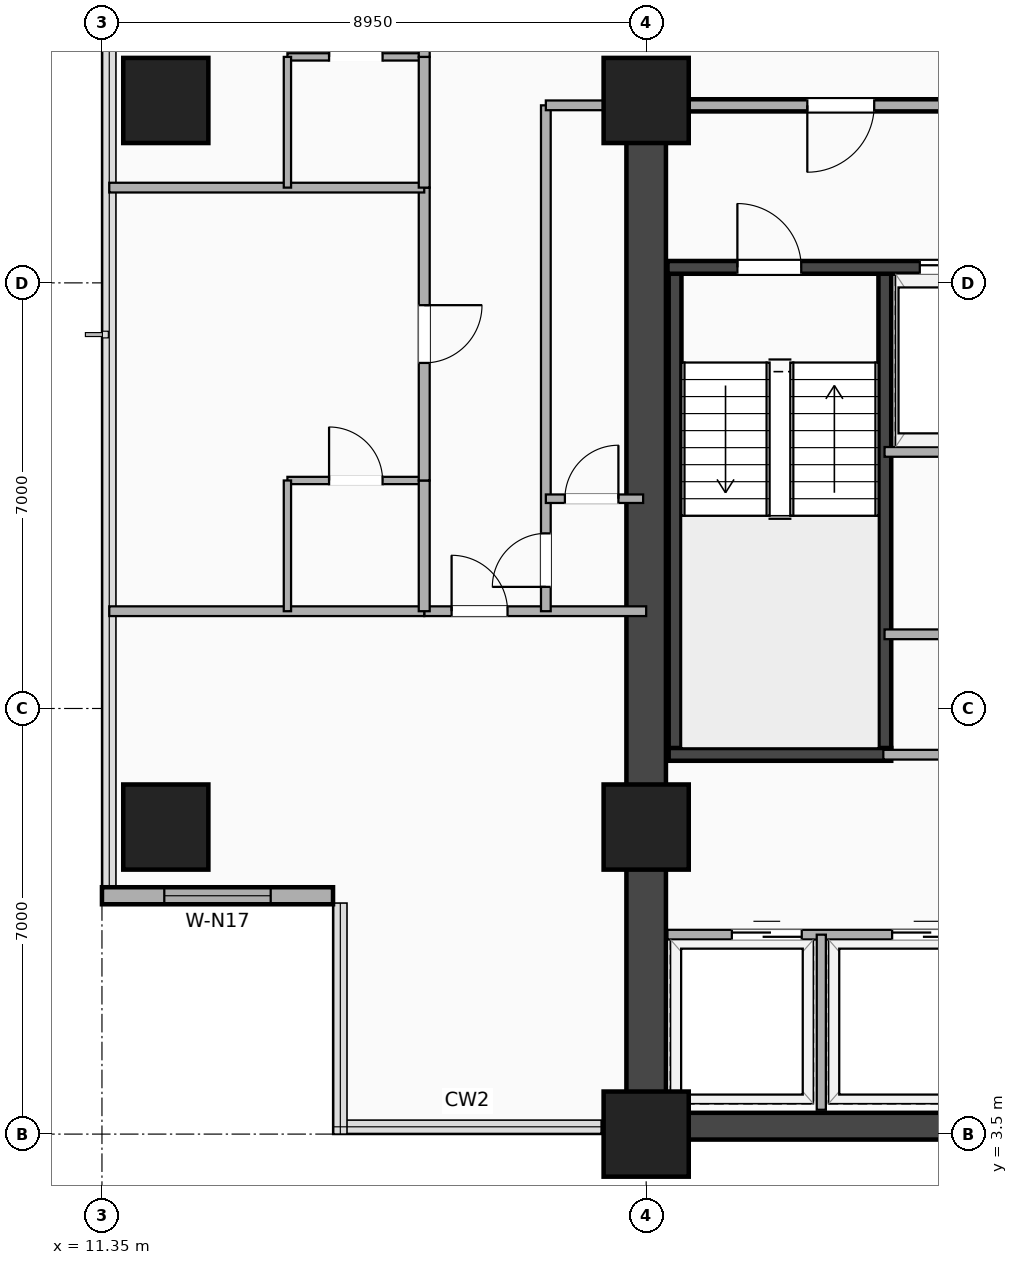
"""IFC4 building model, lengths in metres.
Left out: names, types, materials, properties, quantities, classifications, styles, units other than length and angle.
Written with IfcOpenShell. Run it as: python <this file> out.ifc"""

import sys

from ifc_helpers import new_model, si_unit, direction, frame, frame_2d, origin, origin_2d, place, context, subcontext, project, spatial, rectangle, extrude, element, fill, save


model = new_model("IFC4")
c1 = context("Model", 3, precision=1e-05, world=origin(), true_north=direction((0.0, 1.0)))
c2 = subcontext(c1, "Body", "Model", "MODEL_VIEW")
j1 = project(units=[si_unit("LENGTHUNIT", "METRE"), si_unit("PLANEANGLEUNIT", "RADIAN")], contexts=[c1])
p1 = place(None, origin())
s1 = spatial("IfcSite", under=j1, at=p1, CompositionType="ELEMENT")
p2 = place(p1, origin())
s2 = spatial("IfcBuilding", under=s1, at=p2, CompositionType="ELEMENT")
p3 = place(p2, frame((0.0, 0.0, 68.4)))
s3 = spatial("IfcBuildingStorey", under=s2, at=p3, CompositionType="ELEMENT", Elevation=68.4)
p4 = place(p3, frame((20.3, 3.63, 0.0), z_axis=(0.0, 0.0, 1.0), x_axis=(1.0, 0.0, 0.0)))
e1 = element("IfcWall", 1, at=p4, inside=s3, PredefinedType="SHEAR", context=c2, shape_type="SweptSolid", body=[
    extrude(rectangle(XDim=24.5, YDim=0.44, at=frame_2d((12.25, 0.0))), origin(), (0.0, 0.0, 1.0), 3.22),
])
p5 = place(p3, frame((20.3, 3.5, 0.0), z_axis=(0.0, 0.0, 1.0), x_axis=(0.0, 1.0, 0.0)))
e2 = element("IfcWall", 2, at=p5, inside=s3, PredefinedType="SHEAR", context=c2, shape_type="SweptSolid", body=[
    extrude(rectangle(XDim=16.9, YDim=0.65, at=frame_2d((8.45, 0.0))), origin(), (0.0, 0.0, 1.0), 3.22),
])
for number, where, z_axis, x_axis in (
    (3, (20.775, 9.745, 0.0), (0.0, 0.0, 1.0), (0.0, 1.0, 0.0)),
    (4, (24.225, 9.745, 0.0), (0.0, 0.0, 1.0), (0.0, 1.0, 0.0)),
):
    element("IfcWall", number, at=place(p3, frame(where, z_axis=z_axis, x_axis=x_axis)), inside=s3, PredefinedType="SHEAR", context=c2, shape_type="SweptSolid", body=[
        extrude(rectangle(XDim=8.01, YDim=0.21, at=frame_2d((4.005, 0.0))), origin(), (0.0, 0.0, 1.0), 3.22),
    ])
p6 = place(p3, frame((20.67, 9.745, 0.0), z_axis=(0.0, 0.0, 1.0), x_axis=(1.0, 0.0, 0.0)))
e5 = element("IfcWall", 5, at=p6, inside=s3, PredefinedType="SHEAR", context=c2, shape_type="SweptSolid", body=[
    extrude(rectangle(XDim=3.66, YDim=0.21, at=frame_2d((1.83, 0.0))), origin(), (0.0, 0.0, 1.0), 3.22),
])
p7 = place(p3, frame((20.65, 17.755, 0.0), z_axis=(0.0, 0.0, 1.0), x_axis=(1.0, 0.0, 0.0)))
e6 = element("IfcWall", 6, at=p7, inside=s3, PredefinedType="SHEAR", context=c2, shape_type="SweptSolid", body=[
    extrude(rectangle(XDim=8.3, YDim=0.21, at=frame_2d((4.15, 0.0))), origin(), (0.0, 0.0, 1.0), 3.22),
])
p8 = place(p7, frame((2.2, 0.0, 0.0), z_axis=(0.0, 0.0, 1.0), x_axis=(-1.0, 0.0, 0.0)))
e7 = element("IfcOpeningElement", 7, at=p8, cuts=e6, PredefinedType="OPENING", context=c2, shape_type="SweptSolid", body=[
    extrude(rectangle(XDim=1.05, YDim=2.15, at=frame_2d((0.525, 1.075))), frame((0.0, 0.115, 0.0), z_axis=(0.0, -1.0, 0.0), x_axis=(1.0, 0.0, 0.0)), (0.0, 0.0, 1.0), 0.23),
])
p9 = place(p7, frame((4.15, 0.0, 0.0)))
e8 = element("IfcOpeningElement", 8, at=p9, cuts=e6, PredefinedType="OPENING", context=c2, shape_type="SweptSolid", body=[
    extrude(rectangle(XDim=1.1, YDim=2.18, at=frame_2d((0.55, 1.09))), frame((0.0, 0.115, 0.0), z_axis=(0.0, -1.0, 0.0), x_axis=(1.0, 0.0, 0.0)), (0.0, 0.0, 1.0), 0.23),
])
p10 = place(p7, frame((6.45, 0.0, 0.0)))
e9 = element("IfcOpeningElement", 9, at=p10, cuts=e6, PredefinedType="OPENING", context=c2, shape_type="SweptSolid", body=[
    extrude(rectangle(XDim=1.12, YDim=2.2, at=frame_2d((0.56, 1.1))), frame((0.0, 0.115, 0.0), z_axis=(0.0, -1.0, 0.0), x_axis=(1.0, 0.0, 0.0)), (0.0, 0.0, 1.0), 0.23),
])
for number, where, z_axis, x_axis in (
    (10, (20.3, 3.5, -0.28), (0.0, 0.0, 1.0), (1.0, 0.0, 0.0)),
    (11, (20.3, 8.55, -0.28), (0.0, 0.0, 1.0), (1.0, 0.0, 0.0)),
    (12, (20.3, 20.5, -0.28), (0.0, 0.0, 1.0), (1.0, 0.0, 0.0)),
    (13, (12.4, 8.55, -0.28), (0.0, 0.0, 1.0), (1.0, 0.0, 0.0)),
    (14, (12.4, 20.5, -0.28), (0.0, 0.0, 1.0), (1.0, 0.0, 0.0)),
):
    element("IfcColumn", number, at=place(p3, frame(where, z_axis=z_axis, x_axis=x_axis)), inside=s3, PredefinedType="COLUMN", context=c2, shape_type="SweptSolid", body=[
        extrude(rectangle(XDim=1.4, YDim=1.4, at=origin_2d()), origin(), (0.0, 0.0, 1.0), 3.5),
    ])
p11 = place(p3, frame((11.35, 7.42, 0.0), z_axis=(0.0, 0.0, 1.0), x_axis=(1.0, 0.0, 0.0)))
e15 = element("IfcWall", 15, at=p11, inside=s3, PredefinedType="SOLIDWALL", context=c2, shape_type="SweptSolid", body=[
    extrude(rectangle(XDim=3.8, YDim=0.28, at=frame_2d((1.9, 0.0))), origin(), (0.0, 0.0, 1.0), 3.22),
])
p12 = place(p11, frame((1.025, 0.0, 0.85)))
e16 = element("IfcOpeningElement", 16, at=p12, cuts=e15, PredefinedType="OPENING", context=c2, shape_type="SweptSolid", body=[
    extrude(rectangle(XDim=1.75, YDim=1.65, at=frame_2d((0.875, 0.825))), frame((0.0, 0.15, 0.0), z_axis=(0.0, -1.0, 0.0), x_axis=(1.0, 0.0, 0.0)), (0.0, 0.0, 1.0), 0.3),
])
p13 = place(p3, frame((24.22, 14.72, 0.0), z_axis=(0.0, 0.0, 1.0), x_axis=(1.0, 0.0, 0.0)))
e17 = element("IfcWall", 17, at=p13, inside=s3, PredefinedType="PARTITIONING", context=c2, shape_type="SweptSolid", body=[
    extrude(rectangle(XDim=4.73, YDim=0.16, at=frame_2d((2.365, 0.0))), origin(), (0.0, 0.0, 1.0), 3.22),
])
p14 = place(p3, frame((20.65, 20.42, 0.0), z_axis=(0.0, 0.0, 1.0), x_axis=(1.0, 0.0, 0.0)))
e18 = element("IfcWall", 18, at=p14, inside=s3, PredefinedType="PARTITIONING", context=c2, shape_type="SweptSolid", body=[
    extrude(rectangle(XDim=5.73, YDim=0.2, at=frame_2d((2.865, 0.0))), origin(), (0.0, 0.0, 1.0), 2.51),
])
p15 = place(p14, frame((2.3, 0.0, 0.0)))
e19 = element("IfcOpeningElement", 19, at=p15, cuts=e18, PredefinedType="OPENING", context=c2, shape_type="SweptSolid", body=[
    extrude(rectangle(XDim=1.1, YDim=2.15, at=frame_2d((0.55, 1.075))), frame((0.0, 0.11, 0.0), z_axis=(0.0, -1.0, 0.0), x_axis=(1.0, 0.0, 0.0)), (0.0, 0.0, 1.0), 0.22),
])
p16 = place(p3, frame((24.22, 11.72, 0.0), z_axis=(0.0, 0.0, 1.0), x_axis=(1.0, 0.0, 0.0)))
e20 = element("IfcWall", 20, at=p16, inside=s3, PredefinedType="PARTITIONING", context=c2, shape_type="SweptSolid", body=[
    extrude(rectangle(XDim=4.73, YDim=0.16, at=frame_2d((2.365, 0.0))), origin(), (0.0, 0.0, 1.0), 3.22),
])
p17 = place(p16, frame((1.905, 0.0, 0.0)))
e21 = element("IfcOpeningElement", 21, at=p17, cuts=e20, PredefinedType="OPENING", context=c2, shape_type="SweptSolid", body=[
    extrude(rectangle(XDim=0.92, YDim=2.08, at=frame_2d((0.46, 1.04))), frame((0.0, 0.09, 0.0), z_axis=(0.0, -1.0, 0.0), x_axis=(1.0, 0.0, 0.0)), (0.0, 0.0, 1.0), 0.18),
])
p18 = place(p3, frame((20.65, 6.78, 0.0), z_axis=(0.0, 0.0, 1.0), x_axis=(1.0, 0.0, 0.0)))
e22 = element("IfcWall", 22, at=p18, inside=s3, PredefinedType="PARTITIONING", context=c2, shape_type="SweptSolid", body=[
    extrude(rectangle(XDim=8.3, YDim=0.16, at=frame_2d((4.15, 0.0))), origin(), (0.0, 0.0, 1.0), 2.51),
])
p19 = place(p18, frame((3.695, 0.0, 0.0)))
e23 = element("IfcOpeningElement", 23, at=p19, cuts=e22, PredefinedType="OPENING", context=c2, shape_type="SweptSolid", body=[
    extrude(rectangle(XDim=1.15, YDim=2.2, at=frame_2d((0.575, 1.1))), frame((0.0, 0.09, 0.0), z_axis=(0.0, -1.0, 0.0), x_axis=(1.0, 0.0, 0.0)), (0.0, 0.0, 1.0), 0.18),
])
p20 = place(p18, frame((5.492, 0.0, 0.0)))
e24 = element("IfcOpeningElement", 24, at=p20, cuts=e22, PredefinedType="OPENING", context=c2, shape_type="SweptSolid", body=[
    extrude(rectangle(XDim=1.15, YDim=2.2, at=frame_2d((0.575, 1.1))), frame((0.0, 0.09, 0.0), z_axis=(0.0, -1.0, 0.0), x_axis=(1.0, 0.0, 0.0)), (0.0, 0.0, 1.0), 0.18),
])
p21 = place(p18, frame((1.059, 0.0, 0.0)))
e25 = element("IfcOpeningElement", 25, at=p21, cuts=e22, PredefinedType="OPENING", context=c2, shape_type="SweptSolid", body=[
    extrude(rectangle(XDim=1.15, YDim=2.2, at=frame_2d((0.575, 1.1))), frame((0.0, 0.09, 0.0), z_axis=(0.0, -1.0, 0.0), x_axis=(1.0, 0.0, 0.0)), (0.0, 0.0, 1.0), 0.18),
])
p22 = place(p3, frame((23.18, 3.9, 0.0), z_axis=(0.0, 0.0, 1.0), x_axis=(0.0, 1.0, 0.0)))
e26 = element("IfcWall", 26, at=p22, inside=s3, PredefinedType="PARTITIONING", context=c2, shape_type="SweptSolid", body=[
    extrude(rectangle(XDim=2.88, YDim=0.15, at=frame_2d((1.44, 0.0))), origin(), (0.0, 0.0, 1.0), 3.22),
])
p23 = place(p3, frame((24.2, 9.74, 0.0), z_axis=(0.0, 0.0, 1.0), x_axis=(1.0, 0.0, 0.0)))
e27 = element("IfcWall", 27, at=p23, inside=s3, PredefinedType="PARTITIONING", context=c2, shape_type="SweptSolid", body=[
    extrude(rectangle(XDim=4.8, YDim=0.16, at=frame_2d((2.4, 0.0))), origin(), (0.0, 0.0, 1.0), 3.22),
])
p24 = place(p23, frame((1.85, 0.0, 0.0)))
e28 = element("IfcOpeningElement", 28, at=p24, cuts=e27, PredefinedType="OPENING", context=c2, shape_type="SweptSolid", body=[
    extrude(rectangle(XDim=1.1, YDim=2.15, at=frame_2d((0.55, 1.075))), frame((0.0, 0.09, 0.0), z_axis=(0.0, -1.0, 0.0), x_axis=(1.0, 0.0, 0.0)), (0.0, 0.0, 1.0), 0.18),
])
p25 = place(p3, frame((16.65, 12.1, 0.0), z_axis=(0.0, 0.0, 1.0), x_axis=(1.0, 0.0, 0.0)))
e29 = element("IfcWall", 29, at=p25, inside=s3, PredefinedType="PARTITIONING", context=c2, shape_type="SweptSolid", body=[
    extrude(rectangle(XDim=3.65, YDim=0.16, at=frame_2d((1.825, 0.0))), origin(), (0.0, 0.0, 1.0), 2.51),
])
p26 = place(p25, frame((1.37, 0.0, 0.0), z_axis=(0.0, 0.0, 1.0), x_axis=(-1.0, 0.0, 0.0)))
e30 = element("IfcOpeningElement", 30, at=p26, cuts=e29, PredefinedType="OPENING", context=c2, shape_type="SweptSolid", body=[
    extrude(rectangle(XDim=0.92, YDim=2.08, at=frame_2d((0.46, 1.04))), frame((0.0, 0.09, 0.0), z_axis=(0.0, -1.0, 0.0), x_axis=(1.0, 0.0, 0.0)), (0.0, 0.0, 1.0), 0.18),
])
p27 = place(p3, frame((18.65, 12.1, 0.0), z_axis=(0.0, 0.0, 1.0), x_axis=(0.0, 1.0, 0.0)))
e31 = element("IfcWall", 31, at=p27, inside=s3, PredefinedType="PARTITIONING", context=c2, shape_type="SweptSolid", body=[
    extrude(rectangle(XDim=8.32, YDim=0.16, at=frame_2d((4.16, 0.0))), origin(), (0.0, 0.0, 1.0), 2.51),
])
p28 = place(p27, frame((1.28, 0.0, 0.0), z_axis=(0.0, 0.0, 1.0), x_axis=(-1.0, 0.0, 0.0)))
e32 = element("IfcOpeningElement", 32, at=p28, cuts=e31, PredefinedType="OPENING", context=c2, shape_type="SweptSolid", body=[
    extrude(rectangle(XDim=0.88, YDim=2.08, at=frame_2d((0.44, 1.04))), frame((0.0, 0.09, 0.0), z_axis=(0.0, -1.0, 0.0), x_axis=(1.0, 0.0, 0.0)), (0.0, 0.0, 1.0), 0.18),
])
p29 = place(p3, frame((18.65, 20.42, 0.0), z_axis=(0.0, 0.0, 1.0), x_axis=(1.0, 0.0, 0.0)))
e33 = element("IfcWall", 33, at=p29, inside=s3, PredefinedType="PARTITIONING", context=c2, shape_type="SweptSolid", body=[
    extrude(rectangle(XDim=1.65, YDim=0.16, at=frame_2d((0.825, 0.0))), origin(), (0.0, 0.0, 1.0), 2.51),
])
p30 = place(p3, frame((11.47, 12.1, 0.0), z_axis=(0.0, 0.0, 1.0), x_axis=(1.0, 0.0, 0.0)))
e34 = element("IfcWall", 34, at=p30, inside=s3, PredefinedType="PARTITIONING", context=c2, shape_type="SweptSolid", body=[
    extrude(rectangle(XDim=5.18, YDim=0.16, at=frame_2d((2.59, 0.0))), origin(), (0.0, 0.0, 1.0), 2.583),
])
p31 = place(p3, frame((14.4, 14.25, 0.0), z_axis=(0.0, 0.0, 1.0), x_axis=(1.0, 0.0, 0.0)))
e35 = element("IfcWall", 35, at=p31, inside=s3, PredefinedType="PARTITIONING", context=c2, shape_type="SweptSolid", body=[
    extrude(rectangle(XDim=2.25, YDim=0.12, at=frame_2d((1.125, 0.0))), origin(), (0.0, 0.0, 1.0), 3.22),
])
p32 = place(p31, frame((1.565, 0.0, 0.0), z_axis=(0.0, 0.0, 1.0), x_axis=(-1.0, 0.0, 0.0)))
e36 = element("IfcOpeningElement", 36, at=p32, cuts=e35, PredefinedType="OPENING", context=c2, shape_type="SweptSolid", body=[
    extrude(rectangle(XDim=0.88, YDim=2.08, at=frame_2d((0.44, 1.04))), frame((0.0, 0.07, 0.0), z_axis=(0.0, -1.0, 0.0), x_axis=(1.0, 0.0, 0.0)), (0.0, 0.0, 1.0), 0.14),
])
p33 = place(p3, frame((14.4, 12.1, 0.0), z_axis=(0.0, 0.0, 1.0), x_axis=(0.0, 1.0, 0.0)))
e37 = element("IfcWall", 37, at=p33, inside=s3, PredefinedType="PARTITIONING", context=c2, shape_type="SweptSolid", body=[
    extrude(rectangle(XDim=2.15, YDim=0.12, at=frame_2d((1.075, 0.0))), origin(), (0.0, 0.0, 1.0), 2.902),
])
p34 = place(p3, frame((16.65, 12.1, 0.0), z_axis=(0.0, 0.0, 1.0), x_axis=(0.0, 1.0, 0.0)))
e38 = element("IfcWall", 38, at=p34, inside=s3, PredefinedType="PARTITIONING", context=c2, shape_type="SweptSolid", body=[
    extrude(rectangle(XDim=2.15, YDim=0.18, at=frame_2d((1.075, 0.0))), origin(), (0.0, 0.0, 1.0), 2.902),
])
p35 = place(p3, frame((16.65, 14.25, 0.0), z_axis=(0.0, 0.0, 1.0), x_axis=(0.0, 1.0, 0.0)))
e39 = element("IfcWall", 39, at=p35, inside=s3, PredefinedType="PARTITIONING", context=c2, shape_type="SweptSolid", body=[
    extrude(rectangle(XDim=4.817, YDim=0.18, at=frame_2d((2.408, 0.0))), origin(), (0.0, 0.0, 1.0), 2.902),
])
p36 = place(p35, frame((1.933, 0.0, 0.0)))
e40 = element("IfcOpeningElement", 40, at=p36, cuts=e39, PredefinedType="OPENING", context=c2, shape_type="SweptSolid", body=[
    extrude(rectangle(XDim=0.95, YDim=2.15, at=frame_2d((0.475, 1.075))), frame((0.0, 0.1, 0.0), z_axis=(0.0, -1.0, 0.0), x_axis=(1.0, 0.0, 0.0)), (0.0, 0.0, 1.0), 0.2),
])
p37 = place(p3, frame((11.47, 19.067, 0.0), z_axis=(0.0, 0.0, 1.0), x_axis=(1.0, 0.0, 0.0)))
e41 = element("IfcWall", 41, at=p37, inside=s3, PredefinedType="PARTITIONING", context=c2, shape_type="SweptSolid", body=[
    extrude(rectangle(XDim=5.18, YDim=0.16, at=frame_2d((2.59, 0.0))), origin(), (0.0, 0.0, 1.0), 2.583),
])
p38 = place(p3, frame((14.4, 21.217, 0.0), z_axis=(0.0, 0.0, 1.0), x_axis=(1.0, 0.0, 0.0)))
e42 = element("IfcWall", 42, at=p38, inside=s3, PredefinedType="PARTITIONING", context=c2, shape_type="SweptSolid", body=[
    extrude(rectangle(XDim=2.25, YDim=0.12, at=frame_2d((1.125, 0.0))), origin(), (0.0, 0.0, 1.0), 3.22),
])
p39 = place(p38, frame((1.565, 0.0, 0.0), z_axis=(0.0, 0.0, 1.0), x_axis=(-1.0, 0.0, 0.0)))
e43 = element("IfcOpeningElement", 43, at=p39, cuts=e42, PredefinedType="OPENING", context=c2, shape_type="SweptSolid", body=[
    extrude(rectangle(XDim=0.88, YDim=2.08, at=frame_2d((0.44, 1.04))), frame((0.0, 0.07, 0.0), z_axis=(0.0, -1.0, 0.0), x_axis=(1.0, 0.0, 0.0)), (0.0, 0.0, 1.0), 0.14),
])
p40 = place(p3, frame((14.4, 19.067, 0.0), z_axis=(0.0, 0.0, 1.0), x_axis=(0.0, 1.0, 0.0)))
e44 = element("IfcWall", 44, at=p40, inside=s3, PredefinedType="PARTITIONING", context=c2, shape_type="SweptSolid", body=[
    extrude(rectangle(XDim=2.15, YDim=0.12, at=frame_2d((1.075, 0.0))), origin(), (0.0, 0.0, 1.0), 2.51),
])
p41 = place(p3, frame((16.65, 19.067, 0.0), z_axis=(0.0, 0.0, 1.0), x_axis=(0.0, 1.0, 0.0)))
e45 = element("IfcWall", 45, at=p41, inside=s3, PredefinedType="PARTITIONING", context=c2, shape_type="SweptSolid", body=[
    extrude(rectangle(XDim=2.15, YDim=0.18, at=frame_2d((1.075, 0.0))), origin(), (0.0, 0.0, 1.0), 2.51),
])
p42 = place(p3, frame((16.65, 21.217, 0.0), z_axis=(0.0, 0.0, 1.0), x_axis=(0.0, 1.0, 0.0)))
e46 = element("IfcWall", 46, at=p42, inside=s3, PredefinedType="PARTITIONING", context=c2, shape_type="SweptSolid", body=[
    extrude(rectangle(XDim=4.816, YDim=0.18, at=frame_2d((2.408, 0.0))), origin(), (0.0, 0.0, 1.0), 2.788),
])
p43 = place(p42, frame((1.933, 0.0, 0.0)))
e47 = element("IfcOpeningElement", 47, at=p43, cuts=e46, PredefinedType="OPENING", context=c2, shape_type="SweptSolid", body=[
    extrude(rectangle(XDim=0.95, YDim=2.15, at=frame_2d((0.475, 1.075))), frame((0.0, 0.1, 0.0), z_axis=(0.0, -1.0, 0.0), x_axis=(1.0, 0.0, 0.0)), (0.0, 0.0, 1.0), 0.2),
])
p44 = place(p3, frame((18.65, 13.95, 0.0), z_axis=(0.0, 0.0, 1.0), x_axis=(1.0, 0.0, 0.0)))
e48 = element("IfcWall", 48, at=p44, inside=s3, PredefinedType="PARTITIONING", context=c2, shape_type="SweptSolid", body=[
    extrude(rectangle(XDim=1.6, YDim=0.14, at=frame_2d((0.8, 0.0))), origin(), (0.0, 0.0, 1.0), 2.51),
])
p45 = place(p44, frame((1.193, 0.0, 0.0), z_axis=(0.0, 0.0, 1.0), x_axis=(-1.0, 0.0, 0.0)))
e49 = element("IfcOpeningElement", 49, at=p45, cuts=e48, PredefinedType="OPENING", context=c2, shape_type="SweptSolid", body=[
    extrude(rectangle(XDim=0.88, YDim=2.08, at=frame_2d((0.44, 1.04))), frame((0.0, 0.08, 0.0), z_axis=(0.0, -1.0, 0.0), x_axis=(1.0, 0.0, 0.0)), (0.0, 0.0, 1.0), 0.16),
])
p46 = place(p12, origin())
e50 = element("IfcWindow", 50, at=p46, inside=s3, PartitioningType="SINGLE_PANEL", PredefinedType="WINDOW", context=c2, shape_type="SweptSolid", body=[
    extrude(rectangle(XDim=1.75, YDim=1.65, at=frame_2d((0.875, 0.825))), frame((0.0, 0.03, 0.0), z_axis=(0.0, -1.0, 0.0), x_axis=(1.0, 0.0, 0.0)), (0.0, 0.0, 1.0), 0.06),
])
fill(e16, e50)
p47 = place(p8, origin())
e51 = element("IfcDoor", 51, at=p47, inside=s3, OperationType="SINGLE_SWING_LEFT", PredefinedType="DOOR", context=c2, shape_type="SweptSolid", body=[
    extrude(rectangle(XDim=1.05, YDim=2.15, at=frame_2d((0.525, 1.075))), frame((0.0, 0.025, 0.0), z_axis=(0.0, -1.0, 0.0), x_axis=(1.0, 0.0, 0.0)), (0.0, 0.0, 1.0), 0.05),
])
fill(e7, e51)
p48 = place(p9, origin())
e52 = element("IfcDoor", 52, at=p48, inside=s3, OperationType="DOUBLE_DOOR_SLIDING", PredefinedType="DOOR", context=c2, shape_type="SweptSolid", body=[
    extrude(rectangle(XDim=1.1, YDim=2.18, at=frame_2d((0.55, 1.09))), frame((0.0, 0.025, 0.0), z_axis=(0.0, -1.0, 0.0), x_axis=(1.0, 0.0, 0.0)), (0.0, 0.0, 1.0), 0.05),
])
fill(e8, e52)
p49 = place(p15, origin())
e53 = element("IfcDoor", 53, at=p49, inside=s3, OperationType="SINGLE_SWING_LEFT", PredefinedType="DOOR", context=c2, shape_type="SweptSolid", body=[
    extrude(rectangle(XDim=1.1, YDim=2.15, at=frame_2d((0.55, 1.075))), frame((0.0, 0.025, 0.0), z_axis=(0.0, -1.0, 0.0), x_axis=(1.0, 0.0, 0.0)), (0.0, 0.0, 1.0), 0.05),
])
fill(e19, e53)
p50 = place(p19, origin())
e54 = element("IfcDoor", 54, at=p50, inside=s3, OperationType="DOUBLE_DOOR_SLIDING", PredefinedType="DOOR", context=c2, shape_type="SweptSolid", body=[
    extrude(rectangle(XDim=1.15, YDim=2.2, at=frame_2d((0.575, 1.1))), frame((0.0, 0.025, 0.0), z_axis=(0.0, -1.0, 0.0), x_axis=(1.0, 0.0, 0.0)), (0.0, 0.0, 1.0), 0.05),
])
fill(e23, e54)
p51 = place(p21, origin())
e55 = element("IfcDoor", 55, at=p51, inside=s3, OperationType="DOUBLE_DOOR_SLIDING", PredefinedType="DOOR", context=c2, shape_type="SweptSolid", body=[
    extrude(rectangle(XDim=1.15, YDim=2.2, at=frame_2d((0.575, 1.1))), frame((0.0, 0.025, 0.0), z_axis=(0.0, -1.0, 0.0), x_axis=(1.0, 0.0, 0.0)), (0.0, 0.0, 1.0), 0.05),
])
fill(e25, e55)
p52 = place(p26, origin())
e56 = element("IfcDoor", 56, at=p52, inside=s3, OperationType="SINGLE_SWING_LEFT", PredefinedType="DOOR", context=c2, shape_type="SweptSolid", body=[
    extrude(rectangle(XDim=0.92, YDim=2.08, at=frame_2d((0.46, 1.04))), frame((0.0, 0.025, 0.0), z_axis=(0.0, -1.0, 0.0), x_axis=(1.0, 0.0, 0.0)), (0.0, 0.0, 1.0), 0.05),
])
fill(e30, e56)
p53 = place(p28, origin())
e57 = element("IfcDoor", 57, at=p53, inside=s3, OperationType="SINGLE_SWING_LEFT", PredefinedType="DOOR", context=c2, shape_type="SweptSolid", body=[
    extrude(rectangle(XDim=0.88, YDim=2.08, at=frame_2d((0.44, 1.04))), frame((0.0, 0.025, 0.0), z_axis=(0.0, -1.0, 0.0), x_axis=(1.0, 0.0, 0.0)), (0.0, 0.0, 1.0), 0.05),
])
fill(e32, e57)
p54 = place(p32, origin())
e58 = element("IfcDoor", 58, at=p54, inside=s3, OperationType="SINGLE_SWING_LEFT", PredefinedType="DOOR", context=c2, shape_type="SweptSolid", body=[
    extrude(rectangle(XDim=0.88, YDim=2.08, at=frame_2d((0.44, 1.04))), frame((0.0, 0.025, 0.0), z_axis=(0.0, -1.0, 0.0), x_axis=(1.0, 0.0, 0.0)), (0.0, 0.0, 1.0), 0.05),
])
fill(e36, e58)
p55 = place(p36, origin())
e59 = element("IfcDoor", 59, at=p55, inside=s3, OperationType="SINGLE_SWING_RIGHT", PredefinedType="DOOR", context=c2, shape_type="SweptSolid", body=[
    extrude(rectangle(XDim=0.95, YDim=2.15, at=frame_2d((0.475, 1.075))), frame((0.0, 0.025, 0.0), z_axis=(0.0, -1.0, 0.0), x_axis=(1.0, 0.0, 0.0)), (0.0, 0.0, 1.0), 0.05),
])
fill(e40, e59)
p56 = place(p39, origin())
e60 = element("IfcDoor", 60, at=p56, inside=s3, OperationType="SINGLE_SWING_LEFT", PredefinedType="DOOR", context=c2, shape_type="SweptSolid", body=[
    extrude(rectangle(XDim=0.88, YDim=2.08, at=frame_2d((0.44, 1.04))), frame((0.0, 0.025, 0.0), z_axis=(0.0, -1.0, 0.0), x_axis=(1.0, 0.0, 0.0)), (0.0, 0.0, 1.0), 0.05),
])
fill(e43, e60)
p57 = place(p45, origin())
e61 = element("IfcDoor", 61, at=p57, inside=s3, OperationType="SINGLE_SWING_RIGHT", PredefinedType="DOOR", context=c2, shape_type="SweptSolid", body=[
    extrude(rectangle(XDim=0.88, YDim=2.08, at=frame_2d((0.44, 1.04))), frame((0.0, 0.025, 0.0), z_axis=(0.0, -1.0, 0.0), x_axis=(1.0, 0.0, 0.0)), (0.0, 0.0, 1.0), 0.05),
])
fill(e49, e61)
save(model, sys.argv[1])
